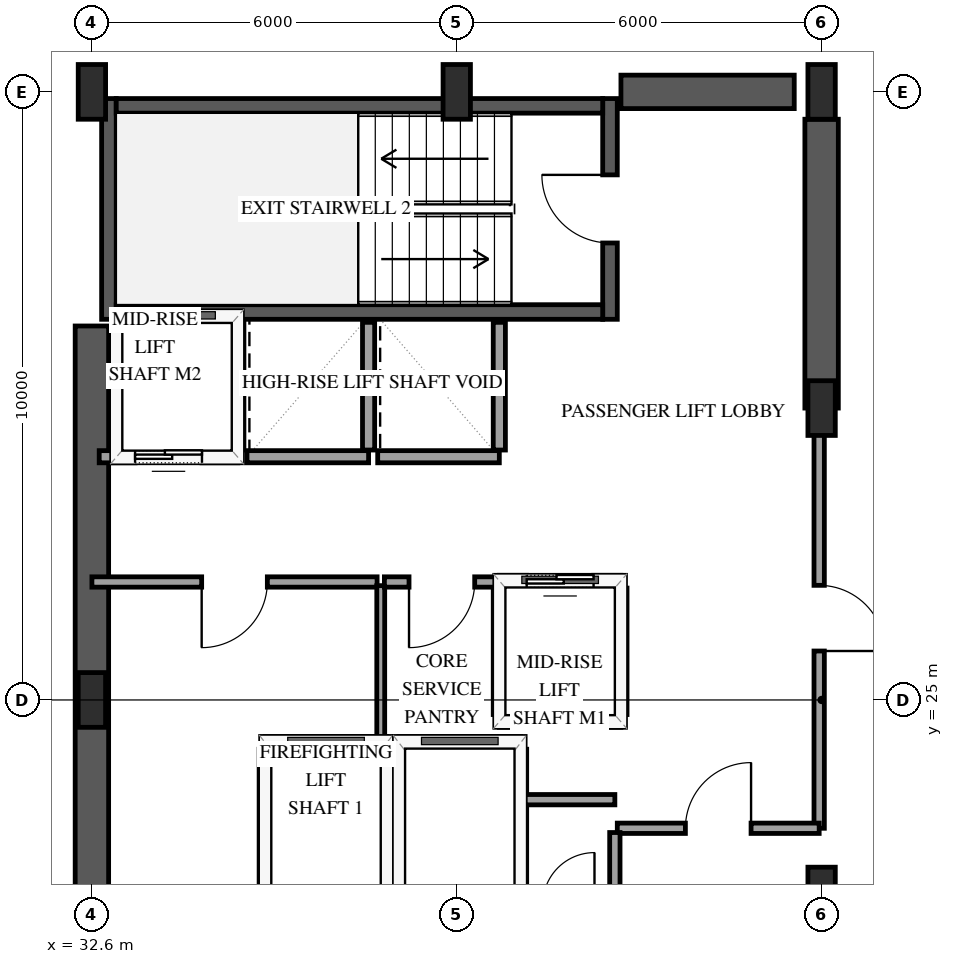
"""IFC4 building model, lengths in metres.
Left out: names, types, materials, properties, quantities, classifications, styles, units other than length and angle.
Written with IfcOpenShell. Run it as: python <this file> out.ifc"""

import sys

from ifc_helpers import new_model, si_unit, direction, frame, frame_2d, origin, origin_2d, place, context, subcontext, project, spatial, rectangle, extrude, element, fill, save


model = new_model("IFC4")
c1 = context("Model", 3, precision=1e-05, world=origin(), true_north=direction((0.0, 1.0)))
c2 = subcontext(c1, "Body", "Model", "MODEL_VIEW")
j1 = project(units=[si_unit("LENGTHUNIT", "METRE"), si_unit("PLANEANGLEUNIT", "RADIAN")], contexts=[c1])
p1 = place(None, origin())
s1 = spatial("IfcSite", under=j1, at=p1, CompositionType="ELEMENT")
p2 = place(p1, origin())
s2 = spatial("IfcBuilding", under=s1, at=p2, CompositionType="ELEMENT")
p3 = place(p2, frame((0.0, 0.0, 167.8)))
s3 = spatial("IfcBuildingStorey", under=s2, at=p3, CompositionType="ELEMENT", Elevation=167.8)
p4 = place(p3, frame((32.88, 31.26, 0.0), z_axis=(0.0, 0.0, 1.0), x_axis=(0.0, 1.0, 0.0)))
e1 = element("IfcWall", 1, at=p4, inside=s3, PredefinedType="SHEAR", context=c2, shape_type="SweptSolid", body=[
    extrude(rectangle(XDim=3.63, YDim=0.24, at=frame_2d((1.815, 0.0))), origin(), (0.0, 0.0, 1.0), 3.6),
])
p5 = place(p3, frame((41.12, 31.26, 0.0), z_axis=(0.0, 0.0, 1.0), x_axis=(0.0, 1.0, 0.0)))
e2 = element("IfcWall", 2, at=p5, inside=s3, PredefinedType="SHEAR", context=c2, shape_type="SweptSolid", body=[
    extrude(rectangle(XDim=3.63, YDim=0.24, at=frame_2d((1.815, 0.0))), origin(), (0.0, 0.0, 1.0), 3.6),
])
p6 = place(p5, frame((1.255, 0.0, 0.0)))
e3 = element("IfcOpeningElement", 3, at=p6, cuts=e2, PredefinedType="OPENING", context=c2, shape_type="SweptSolid", body=[
    extrude(rectangle(XDim=1.12, YDim=2.15, at=frame_2d((0.56, 1.075))), frame((0.0, 0.13, 0.0), z_axis=(0.0, -1.0, 0.0), x_axis=(1.0, 0.0, 0.0)), (0.0, 0.0, 1.0), 0.26),
])
for number, where, z_axis, x_axis in (
    (4, (33.0, 31.38, 0.0), (0.0, 0.0, 1.0), (1.0, 0.0, 0.0)),
    (5, (33.0, 34.77, 0.0), (0.0, 0.0, 1.0), (1.0, 0.0, 0.0)),
):
    element("IfcWall", number, at=place(p3, frame(where, z_axis=z_axis, x_axis=x_axis)), inside=s3, PredefinedType="SHEAR", context=c2, shape_type="SweptSolid", body=[
        extrude(rectangle(XDim=8.0, YDim=0.24, at=frame_2d((4.0, 0.0))), origin(), (0.0, 0.0, 1.0), 3.6),
    ])
p7 = place(p3, frame((32.6, 18.85, 0.0), z_axis=(0.0, 0.0, 1.0), x_axis=(0.0, 1.0, 0.0)))
e6 = element("IfcWall", 6, at=p7, inside=s3, PredefinedType="SHEAR", context=c2, shape_type="SweptSolid", body=[
    extrude(rectangle(XDim=12.3, YDim=0.55, at=frame_2d((6.15, 0.0))), origin(), (0.0, 0.0, 1.0), 3.6),
])
p8 = place(p3, frame((41.3, 35.0, 0.0), z_axis=(0.0, 0.0, 1.0), x_axis=(1.0, 0.0, 0.0)))
e7 = element("IfcWall", 7, at=p8, inside=s3, PredefinedType="SHEAR", context=c2, shape_type="SweptSolid", body=[
    extrude(rectangle(XDim=2.85, YDim=0.55, at=frame_2d((1.425, 0.0))), origin(), (0.0, 0.0, 1.0), 3.6),
])
p9 = place(p3, frame((44.6, 29.8, 0.0), z_axis=(0.0, 0.0, 1.0), x_axis=(0.0, 1.0, 0.0)))
e8 = element("IfcWall", 8, at=p9, inside=s3, PredefinedType="SHEAR", context=c2, shape_type="SweptSolid", body=[
    extrude(rectangle(XDim=4.75, YDim=0.55, at=frame_2d((2.375, 0.0))), origin(), (0.0, 0.0, 1.0), 3.6),
])
for number, where, z_axis, x_axis in (
    (9, (32.6, 25.0, 0.0), (0.0, 0.0, 1.0), (1.0, 0.0, 0.0)),
    (10, (32.6, 35.0, 0.0), (0.0, 0.0, 1.0), (1.0, 0.0, 0.0)),
    (11, (38.6, 35.0, 0.0), (0.0, 0.0, 1.0), (1.0, 0.0, 0.0)),
    (12, (44.6, 21.8, 0.0), (0.0, 0.0, 1.0), (1.0, 0.0, 0.0)),
    (13, (44.6, 29.8, 0.0), (0.0, 0.0, 1.0), (1.0, 0.0, 0.0)),
    (14, (44.6, 35.0, 0.0), (0.0, 0.0, 1.0), (1.0, 0.0, 0.0)),
):
    element("IfcColumn", number, at=place(p3, frame(where, z_axis=z_axis, x_axis=x_axis)), inside=s3, PredefinedType="PILASTER", context=c2, shape_type="SweptSolid", body=[
        extrude(rectangle(XDim=0.45, YDim=0.9, at=origin_2d()), origin(), (0.0, 0.0, 1.0), 3.6),
    ])
p10 = place(p3, frame((35.45, 24.3, 0.0), z_axis=(0.0, 0.0, 1.0), x_axis=(1.0, 0.0, 0.0)))
e15 = element("IfcWall", 15, at=p10, inside=s3, PredefinedType="SOLIDWALL", context=c2, shape_type="SweptSolid", body=[
    extrude(rectangle(XDim=2.0, YDim=0.2, at=frame_2d((1.0, 0.0))), origin(), (0.0, 0.0, 1.0), 3.3),
])
for number, where, z_axis, x_axis in (
    (16, (35.45, 21.81, 0.0), (0.0, 0.0, 1.0), (0.0, 1.0, 0.0)),
    (17, (37.45, 21.81, 0.0), (0.0, 0.0, 1.0), (0.0, 1.0, 0.0)),
):
    element("IfcWall", number, at=place(p3, frame(where, z_axis=z_axis, x_axis=x_axis)), inside=s3, PredefinedType="SOLIDWALL", context=c2, shape_type="SweptSolid", body=[
        extrude(rectangle(XDim=2.38, YDim=0.2, at=frame_2d((1.19, 0.0))), origin(), (0.0, 0.0, 1.0), 3.3),
    ])
p11 = place(p3, frame((37.65, 24.3, 0.0), z_axis=(0.0, 0.0, 1.0), x_axis=(1.0, 0.0, 0.0)))
e18 = element("IfcWall", 18, at=p11, inside=s3, PredefinedType="SOLIDWALL", context=c2, shape_type="SweptSolid", body=[
    extrude(rectangle(XDim=2.0, YDim=0.2, at=frame_2d((1.0, 0.0))), origin(), (0.0, 0.0, 1.0), 3.3),
])
p12 = place(p3, frame((39.65, 21.81, 0.0), z_axis=(0.0, 0.0, 1.0), x_axis=(0.0, 1.0, 0.0)))
e19 = element("IfcWall", 19, at=p12, inside=s3, PredefinedType="SOLIDWALL", context=c2, shape_type="SweptSolid", body=[
    extrude(rectangle(XDim=2.38, YDim=0.2, at=frame_2d((1.19, 0.0))), origin(), (0.0, 0.0, 1.0), 3.3),
])
p13 = place(p3, frame((39.3, 24.65, 0.0), z_axis=(0.0, 0.0, 1.0), x_axis=(1.0, 0.0, 0.0)))
e20 = element("IfcWall", 20, at=p13, inside=s3, PredefinedType="SOLIDWALL", context=c2, shape_type="SweptSolid", body=[
    extrude(rectangle(XDim=2.0, YDim=0.2, at=frame_2d((1.0, 0.0))), origin(), (0.0, 0.0, 1.0), 3.3),
])
p14 = place(p3, frame((39.3, 26.95, 0.0), z_axis=(0.0, 0.0, 1.0), x_axis=(1.0, 0.0, 0.0)))
e21 = element("IfcWall", 21, at=p14, inside=s3, PredefinedType="SOLIDWALL", context=c2, shape_type="SweptSolid", body=[
    extrude(rectangle(XDim=2.0, YDim=0.2, at=frame_2d((1.0, 0.0))), origin(), (0.0, 0.0, 1.0), 3.3),
])
p15 = place(p14, frame((0.45, 0.0, 0.0)))
e22 = element("IfcOpeningElement", 22, at=p15, cuts=e21, PredefinedType="OPENING", context=c2, shape_type="SweptSolid", body=[
    extrude(rectangle(XDim=1.1, YDim=2.15, at=frame_2d((0.55, 1.075))), frame((0.0, 0.11, 0.0), z_axis=(0.0, -1.0, 0.0), x_axis=(1.0, 0.0, 0.0)), (0.0, 0.0, 1.0), 0.22),
])
for number, where, z_axis, x_axis in (
    (23, (39.3, 24.76, 0.0), (0.0, 0.0, 1.0), (0.0, 1.0, 0.0)),
    (24, (41.3, 24.76, 0.0), (0.0, 0.0, 1.0), (0.0, 1.0, 0.0)),
):
    element("IfcWall", number, at=place(p3, frame(where, z_axis=z_axis, x_axis=x_axis)), inside=s3, PredefinedType="SOLIDWALL", context=c2, shape_type="SweptSolid", body=[
        extrude(rectangle(XDim=2.08, YDim=0.2, at=frame_2d((1.04, 0.0))), origin(), (0.0, 0.0, 1.0), 3.3),
    ])
p16 = place(p3, frame((32.72, 29.0, 0.0), z_axis=(0.0, 0.0, 1.0), x_axis=(1.0, 0.0, 0.0)))
e25 = element("IfcWall", 25, at=p16, inside=s3, PredefinedType="SOLIDWALL", context=c2, shape_type="SweptSolid", body=[
    extrude(rectangle(XDim=2.28, YDim=0.2, at=frame_2d((1.14, 0.0))), origin(), (0.0, 0.0, 1.0), 3.3),
])
p17 = place(p16, frame((0.59, 0.0, 0.0)))
e26 = element("IfcOpeningElement", 26, at=p17, cuts=e25, PredefinedType="OPENING", context=c2, shape_type="SweptSolid", body=[
    extrude(rectangle(XDim=1.1, YDim=2.15, at=frame_2d((0.55, 1.075))), frame((0.0, 0.11, 0.0), z_axis=(0.0, -1.0, 0.0), x_axis=(1.0, 0.0, 0.0)), (0.0, 0.0, 1.0), 0.22),
])
p18 = place(p3, frame((35.0, 29.11, 0.0), z_axis=(0.0, 0.0, 1.0), x_axis=(0.0, 1.0, 0.0)))
e27 = element("IfcWall", 27, at=p18, inside=s3, PredefinedType="SOLIDWALL", context=c2, shape_type="SweptSolid", body=[
    extrude(rectangle(XDim=2.1, YDim=0.2, at=frame_2d((1.05, 0.0))), origin(), (0.0, 0.0, 1.0), 3.3),
])
p19 = place(p3, frame((35.15, 29.0, 0.0), z_axis=(0.0, 0.0, 1.0), x_axis=(1.0, 0.0, 0.0)))
e28 = element("IfcWall", 28, at=p19, inside=s3, PredefinedType="SOLIDWALL", context=c2, shape_type="SweptSolid", body=[
    extrude(rectangle(XDim=2.0, YDim=0.2, at=frame_2d((1.0, 0.0))), origin(), (0.0, 0.0, 1.0), 2.674),
])
p20 = place(p3, frame((37.15, 29.11, 0.0), z_axis=(0.0, 0.0, 1.0), x_axis=(0.0, 1.0, 0.0)))
e29 = element("IfcWall", 29, at=p20, inside=s3, PredefinedType="SOLIDWALL", context=c2, shape_type="SweptSolid", body=[
    extrude(rectangle(XDim=2.1, YDim=0.2, at=frame_2d((1.05, 0.0))), origin(), (0.0, 0.0, 1.0), 3.3),
])
p21 = place(p3, frame((37.3, 29.0, 0.0), z_axis=(0.0, 0.0, 1.0), x_axis=(1.0, 0.0, 0.0)))
e30 = element("IfcWall", 30, at=p21, inside=s3, PredefinedType="SOLIDWALL", context=c2, shape_type="SweptSolid", body=[
    extrude(rectangle(XDim=2.0, YDim=0.2, at=frame_2d((1.0, 0.0))), origin(), (0.0, 0.0, 1.0), 2.674),
])
p22 = place(p3, frame((39.3, 29.11, 0.0), z_axis=(0.0, 0.0, 1.0), x_axis=(0.0, 1.0, 0.0)))
e31 = element("IfcWall", 31, at=p22, inside=s3, PredefinedType="SOLIDWALL", context=c2, shape_type="SweptSolid", body=[
    extrude(rectangle(XDim=2.1, YDim=0.2, at=frame_2d((1.05, 0.0))), origin(), (0.0, 0.0, 1.0), 3.3),
])
p23 = place(p3, frame((44.56, 29.8, 0.0), z_axis=(0.0, 0.0, 1.0), x_axis=(0.0, -1.0, 0.0)))
e32 = element("IfcWall", 32, at=p23, inside=s3, PredefinedType="PARTITIONING", context=c2, shape_type="SweptSolid", body=[
    extrude(rectangle(XDim=6.91, YDim=0.17, at=frame_2d((3.455, 0.0))), origin(), (0.0, 0.0, 1.0), 2.34),
])
p24 = place(p23, frame((2.915, 0.0, 0.0)))
e33 = element("IfcOpeningElement", 33, at=p24, cuts=e32, PredefinedType="OPENING", context=c2, shape_type="SweptSolid", body=[
    extrude(rectangle(XDim=1.08, YDim=2.15, at=frame_2d((0.54, 1.075))), frame((0.0, 0.095, 0.0), z_axis=(0.0, -1.0, 0.0), x_axis=(1.0, 0.0, 0.0)), (0.0, 0.0, 1.0), 0.19),
])
p25 = place(p3, frame((37.29, 26.94, 0.0), z_axis=(0.0, 0.0, 1.0), x_axis=(-1.0, 0.0, 0.0)))
e34 = element("IfcWall", 34, at=p25, inside=s3, PredefinedType="PARTITIONING", context=c2, shape_type="SweptSolid", body=[
    extrude(rectangle(XDim=4.69, YDim=0.17, at=frame_2d((2.345, 0.0))), origin(), (0.0, 0.0, 1.0), 3.3),
])
p26 = place(p25, frame((1.805, 0.0, 0.0)))
e35 = element("IfcOpeningElement", 35, at=p26, cuts=e34, PredefinedType="OPENING", context=c2, shape_type="SweptSolid", body=[
    extrude(rectangle(XDim=1.08, YDim=2.15, at=frame_2d((0.54, 1.075))), frame((0.0, 0.095, 0.0), z_axis=(0.0, -1.0, 0.0), x_axis=(1.0, 0.0, 0.0)), (0.0, 0.0, 1.0), 0.19),
])
p27 = place(p3, frame((41.24, 22.89, 0.0), z_axis=(0.0, 0.0, 1.0), x_axis=(1.0, 0.0, 0.0)))
e36 = element("IfcWall", 36, at=p27, inside=s3, PredefinedType="PARTITIONING", context=c2, shape_type="SweptSolid", body=[
    extrude(rectangle(XDim=3.32, YDim=0.17, at=frame_2d((1.66, 0.0))), origin(), (0.0, 0.0, 1.0), 3.3),
])
p28 = place(p27, frame((1.12, 0.0, 0.0)))
e37 = element("IfcOpeningElement", 37, at=p28, cuts=e36, PredefinedType="OPENING", context=c2, shape_type="SweptSolid", body=[
    extrude(rectangle(XDim=1.08, YDim=2.15, at=frame_2d((0.54, 1.075))), frame((0.0, 0.095, 0.0), z_axis=(0.0, -1.0, 0.0), x_axis=(1.0, 0.0, 0.0)), (0.0, 0.0, 1.0), 0.19),
])
p29 = place(p3, frame((37.35, 26.88, 0.0), z_axis=(0.0, 0.0, 1.0), x_axis=(0.0, -1.0, 0.0)))
e38 = element("IfcWall", 38, at=p29, inside=s3, PredefinedType="PARTITIONING", context=c2, shape_type="SweptSolid", body=[
    extrude(rectangle(XDim=2.58, YDim=0.13, at=frame_2d((1.29, 0.0))), origin(), (0.0, 0.0, 1.0), 3.3),
])
p30 = place(p3, frame((39.3, 26.94, 0.0), z_axis=(0.0, 0.0, 1.0), x_axis=(-1.0, 0.0, 0.0)))
e39 = element("IfcWall", 39, at=p30, inside=s3, PredefinedType="PARTITIONING", context=c2, shape_type="SweptSolid", body=[
    extrude(rectangle(XDim=1.89, YDim=0.17, at=frame_2d((0.945, 0.0))), origin(), (0.0, 0.0, 1.0), 3.3),
])
p31 = place(p30, frame((0.405, 0.0, 0.0)))
e40 = element("IfcOpeningElement", 40, at=p31, cuts=e39, PredefinedType="OPENING", context=c2, shape_type="SweptSolid", body=[
    extrude(rectangle(XDim=1.08, YDim=2.15, at=frame_2d((0.54, 1.075))), frame((0.0, 0.095, 0.0), z_axis=(0.0, -1.0, 0.0), x_axis=(1.0, 0.0, 0.0)), (0.0, 0.0, 1.0), 0.19),
])
p32 = place(p3, frame((41.2, 21.7, 0.0), z_axis=(0.0, 0.0, 1.0), x_axis=(0.0, 1.0, 0.0)))
e41 = element("IfcWall", 41, at=p32, inside=s3, PredefinedType="PARTITIONING", context=c2, shape_type="SweptSolid", body=[
    extrude(rectangle(XDim=1.12, YDim=0.17, at=frame_2d((0.56, 0.0))), origin(), (0.0, 0.0, 1.0), 3.3),
])
p33 = place(p3, frame((41.2, 23.36, 0.0), z_axis=(0.0, 0.0, 1.0), x_axis=(-1.0, 0.0, 0.0)))
e42 = element("IfcWall", 42, at=p33, inside=s3, PredefinedType="PARTITIONING", context=c2, shape_type="SweptSolid", body=[
    extrude(rectangle(XDim=1.48, YDim=0.17, at=frame_2d((0.74, 0.0))), origin(), (0.0, 0.0, 1.0), 3.3),
])
p34 = place(p15, origin())
e43 = element("IfcDoor", 43, at=p34, inside=s3, OperationType="SLIDING_TO_LEFT", PredefinedType="DOOR", context=c2, shape_type="SweptSolid", body=[
    extrude(rectangle(XDim=1.1, YDim=2.15, at=frame_2d((0.55, 1.075))), frame((0.0, 0.025, 0.0), z_axis=(0.0, -1.0, 0.0), x_axis=(1.0, 0.0, 0.0)), (0.0, 0.0, 1.0), 0.05),
])
fill(e22, e43)
p35 = place(p17, origin())
e44 = element("IfcDoor", 44, at=p35, inside=s3, OperationType="SLIDING_TO_LEFT", PredefinedType="DOOR", context=c2, shape_type="SweptSolid", body=[
    extrude(rectangle(XDim=1.1, YDim=2.15, at=frame_2d((0.55, 1.075))), frame((0.0, 0.025, 0.0), z_axis=(0.0, -1.0, 0.0), x_axis=(1.0, 0.0, 0.0)), (0.0, 0.0, 1.0), 0.05),
])
fill(e26, e44)
p36 = place(p6, origin())
e45 = element("IfcDoor", 45, at=p36, inside=s3, OperationType="SINGLE_SWING_RIGHT", PredefinedType="DOOR", context=c2, shape_type="SweptSolid", body=[
    extrude(rectangle(XDim=1.12, YDim=2.15, at=frame_2d((0.56, 1.075))), frame((0.0, 0.025, 0.0), z_axis=(0.0, -1.0, 0.0), x_axis=(1.0, 0.0, 0.0)), (0.0, 0.0, 1.0), 0.05),
])
fill(e3, e45)
p37 = place(p24, origin())
e46 = element("IfcDoor", 46, at=p37, inside=s3, OperationType="SINGLE_SWING_RIGHT", PredefinedType="DOOR", context=c2, shape_type="SweptSolid", body=[
    extrude(rectangle(XDim=1.08, YDim=2.15, at=frame_2d((0.54, 1.075))), frame((0.0, 0.025, 0.0), z_axis=(0.0, -1.0, 0.0), x_axis=(1.0, 0.0, 0.0)), (0.0, 0.0, 1.0), 0.05),
])
fill(e33, e46)
p38 = place(p26, origin())
e47 = element("IfcDoor", 47, at=p38, inside=s3, OperationType="SINGLE_SWING_RIGHT", PredefinedType="DOOR", context=c2, shape_type="SweptSolid", body=[
    extrude(rectangle(XDim=1.08, YDim=2.15, at=frame_2d((0.54, 1.075))), frame((0.0, 0.025, 0.0), z_axis=(0.0, -1.0, 0.0), x_axis=(1.0, 0.0, 0.0)), (0.0, 0.0, 1.0), 0.05),
])
fill(e35, e47)
p39 = place(p28, origin())
e48 = element("IfcDoor", 48, at=p39, inside=s3, OperationType="SINGLE_SWING_RIGHT", PredefinedType="DOOR", context=c2, shape_type="SweptSolid", body=[
    extrude(rectangle(XDim=1.08, YDim=2.15, at=frame_2d((0.54, 1.075))), frame((0.0, 0.025, 0.0), z_axis=(0.0, -1.0, 0.0), x_axis=(1.0, 0.0, 0.0)), (0.0, 0.0, 1.0), 0.05),
])
fill(e37, e48)
p40 = place(p31, origin())
e49 = element("IfcDoor", 49, at=p40, inside=s3, OperationType="SINGLE_SWING_RIGHT", PredefinedType="DOOR", context=c2, shape_type="SweptSolid", body=[
    extrude(rectangle(XDim=1.08, YDim=2.15, at=frame_2d((0.54, 1.075))), frame((0.0, 0.025, 0.0), z_axis=(0.0, -1.0, 0.0), x_axis=(1.0, 0.0, 0.0)), (0.0, 0.0, 1.0), 0.05),
])
fill(e40, e49)
save(model, sys.argv[1])
